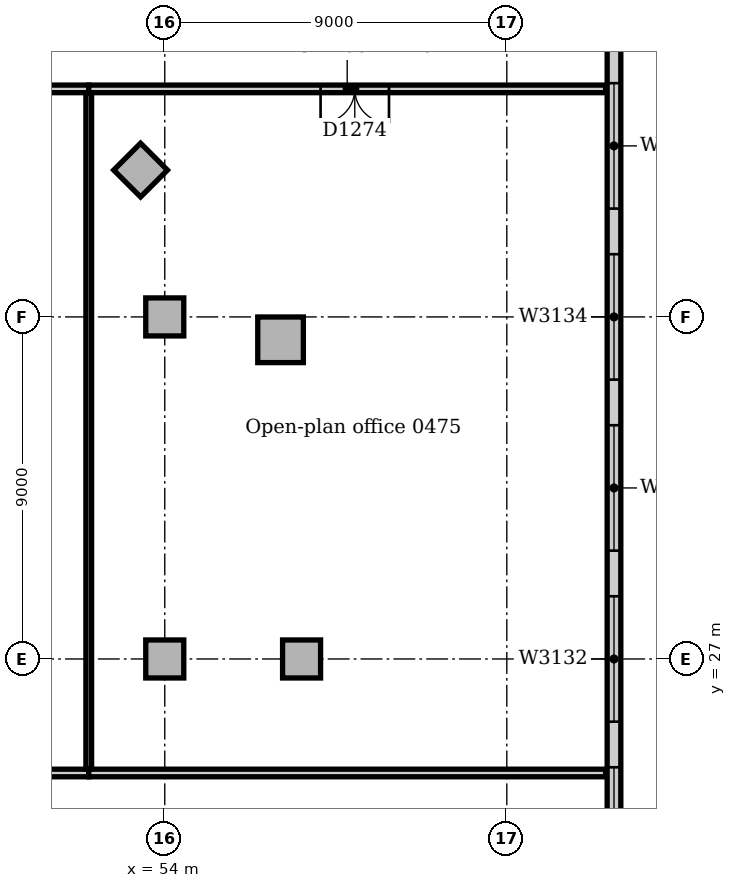
"""IFC4 building model, lengths in metres.
Left out: names, types, materials, properties, quantities, classifications, styles, units other than length and angle.
Written with IfcOpenShell. Run it as: python <this file> out.ifc"""

import sys

from ifc_helpers import new_model, si_unit, direction, frame, frame_2d, origin, origin_2d, place, context, subcontext, project, spatial, rectangle, extrude, element, fill, save


model = new_model("IFC4")
c1 = context("Model", 3, precision=1e-05, world=origin(), true_north=direction((0.0, 1.0)))
c2 = subcontext(c1, "Body", "Model", "MODEL_VIEW")
j1 = project(units=[si_unit("LENGTHUNIT", "METRE"), si_unit("PLANEANGLEUNIT", "RADIAN")], contexts=[c1])
p1 = place(None, origin())
s1 = spatial("IfcSite", under=j1, at=p1, CompositionType="ELEMENT")
p2 = place(p1, origin())
s2 = spatial("IfcBuilding", under=s1, at=p2, CompositionType="ELEMENT")
p3 = place(p2, frame((0.0, 0.0, 21.0)))
s3 = spatial("IfcBuildingStorey", under=s2, at=p3, CompositionType="ELEMENT", Elevation=21.0)
p4 = place(p3, frame((57.047, 35.398, 0.0), z_axis=(0.0, 0.0, 1.0), x_axis=(1.0, 0.0, 0.0)))
e1 = element("IfcColumn", 1, at=p4, inside=s3, PredefinedType="COLUMN", context=c2, shape_type="SweptSolid", body=[
    extrude(rectangle(XDim=1.2, YDim=1.2, at=origin_2d()), origin(), (0.0, 0.0, 1.0), 4.85),
])
for number, where, z_axis, x_axis in (
    (2, (57.6, 27.0, 0.0), (0.0, 0.0, 1.0), (1.0, 0.0, 0.0)),
    (3, (53.364, 39.864, 0.0), (0.0, 0.0, 1.0), (0.707, 0.707, 0.0)),
    (4, (54.0, 27.0, 0.0), (0.0, 0.0, 1.0), (1.0, 0.0, 0.0)),
    (5, (54.0, 36.0, 0.0), (0.0, 0.0, 1.0), (1.0, 0.0, 0.0)),
):
    element("IfcColumn", number, at=place(p3, frame(where, z_axis=z_axis, x_axis=x_axis)), inside=s3, PredefinedType="COLUMN", context=c2, shape_type="SweptSolid", body=[
        extrude(rectangle(XDim=1.0, YDim=1.0, at=origin_2d()), origin(), (0.0, 0.0, 1.0), 4.85),
    ])
p5 = place(p3, frame((65.82, -9.0, 0.0), z_axis=(0.0, 0.0, 1.0), x_axis=(0.0, 1.0, 0.0)))
e6 = element("IfcWall", 6, at=p5, inside=s3, PredefinedType="STANDARD", context=c2, shape_type="SweptSolid", body=[
    extrude(rectangle(XDim=63.0, YDim=0.36, at=frame_2d((31.5, 0.0))), origin(), (0.0, 0.0, 1.0), 4.85),
])
p6 = place(p5, frame((2.85, 0.0, 0.9)))
e7 = element("IfcOpeningElement", 7, at=p6, cuts=e6, PredefinedType="OPENING", context=c2, shape_type="SweptSolid", body=[
    extrude(rectangle(XDim=3.3, YDim=2.4, at=frame_2d((1.65, 1.2))), frame((0.0, 0.19, 0.0), z_axis=(0.0, -1.0, 0.0), x_axis=(1.0, 0.0, 0.0)), (0.0, 0.0, 1.0), 0.38),
])
p7 = place(p5, frame((7.35, 0.0, 0.9)))
e8 = element("IfcOpeningElement", 8, at=p7, cuts=e6, PredefinedType="OPENING", context=c2, shape_type="SweptSolid", body=[
    extrude(rectangle(XDim=3.3, YDim=2.4, at=frame_2d((1.65, 1.2))), frame((0.0, 0.19, 0.0), z_axis=(0.0, -1.0, 0.0), x_axis=(1.0, 0.0, 0.0)), (0.0, 0.0, 1.0), 0.38),
])
p8 = place(p5, frame((11.85, 0.0, 0.9)))
e9 = element("IfcOpeningElement", 9, at=p8, cuts=e6, PredefinedType="OPENING", context=c2, shape_type="SweptSolid", body=[
    extrude(rectangle(XDim=3.3, YDim=2.4, at=frame_2d((1.65, 1.2))), frame((0.0, 0.19, 0.0), z_axis=(0.0, -1.0, 0.0), x_axis=(1.0, 0.0, 0.0)), (0.0, 0.0, 1.0), 0.38),
])
p9 = place(p5, frame((16.35, 0.0, 0.9)))
e10 = element("IfcOpeningElement", 10, at=p9, cuts=e6, PredefinedType="OPENING", context=c2, shape_type="SweptSolid", body=[
    extrude(rectangle(XDim=3.3, YDim=2.4, at=frame_2d((1.65, 1.2))), frame((0.0, 0.19, 0.0), z_axis=(0.0, -1.0, 0.0), x_axis=(1.0, 0.0, 0.0)), (0.0, 0.0, 1.0), 0.38),
])
p10 = place(p5, frame((20.85, 0.0, 0.9)))
e11 = element("IfcOpeningElement", 11, at=p10, cuts=e6, PredefinedType="OPENING", context=c2, shape_type="SweptSolid", body=[
    extrude(rectangle(XDim=3.3, YDim=2.4, at=frame_2d((1.65, 1.2))), frame((0.0, 0.19, 0.0), z_axis=(0.0, -1.0, 0.0), x_axis=(1.0, 0.0, 0.0)), (0.0, 0.0, 1.0), 0.38),
])
p11 = place(p5, frame((25.35, 0.0, 0.9)))
e12 = element("IfcOpeningElement", 12, at=p11, cuts=e6, PredefinedType="OPENING", context=c2, shape_type="SweptSolid", body=[
    extrude(rectangle(XDim=3.3, YDim=2.4, at=frame_2d((1.65, 1.2))), frame((0.0, 0.19, 0.0), z_axis=(0.0, -1.0, 0.0), x_axis=(1.0, 0.0, 0.0)), (0.0, 0.0, 1.0), 0.38),
])
p12 = place(p5, frame((29.85, 0.0, 0.9)))
e13 = element("IfcOpeningElement", 13, at=p12, cuts=e6, PredefinedType="OPENING", context=c2, shape_type="SweptSolid", body=[
    extrude(rectangle(XDim=3.3, YDim=2.4, at=frame_2d((1.65, 1.2))), frame((0.0, 0.19, 0.0), z_axis=(0.0, -1.0, 0.0), x_axis=(1.0, 0.0, 0.0)), (0.0, 0.0, 1.0), 0.38),
])
p13 = place(p5, frame((34.35, 0.0, 0.9)))
e14 = element("IfcOpeningElement", 14, at=p13, cuts=e6, PredefinedType="OPENING", context=c2, shape_type="SweptSolid", body=[
    extrude(rectangle(XDim=3.3, YDim=2.4, at=frame_2d((1.65, 1.2))), frame((0.0, 0.19, 0.0), z_axis=(0.0, -1.0, 0.0), x_axis=(1.0, 0.0, 0.0)), (0.0, 0.0, 1.0), 0.38),
])
p14 = place(p5, frame((38.85, 0.0, 0.9)))
e15 = element("IfcOpeningElement", 15, at=p14, cuts=e6, PredefinedType="OPENING", context=c2, shape_type="SweptSolid", body=[
    extrude(rectangle(XDim=3.3, YDim=2.4, at=frame_2d((1.65, 1.2))), frame((0.0, 0.19, 0.0), z_axis=(0.0, -1.0, 0.0), x_axis=(1.0, 0.0, 0.0)), (0.0, 0.0, 1.0), 0.38),
])
p15 = place(p5, frame((43.35, 0.0, 0.9)))
e16 = element("IfcOpeningElement", 16, at=p15, cuts=e6, PredefinedType="OPENING", context=c2, shape_type="SweptSolid", body=[
    extrude(rectangle(XDim=3.3, YDim=2.4, at=frame_2d((1.65, 1.2))), frame((0.0, 0.19, 0.0), z_axis=(0.0, -1.0, 0.0), x_axis=(1.0, 0.0, 0.0)), (0.0, 0.0, 1.0), 0.38),
])
p16 = place(p5, frame((47.85, 0.0, 0.9)))
e17 = element("IfcOpeningElement", 17, at=p16, cuts=e6, PredefinedType="OPENING", context=c2, shape_type="SweptSolid", body=[
    extrude(rectangle(XDim=3.3, YDim=2.4, at=frame_2d((1.65, 1.2))), frame((0.0, 0.19, 0.0), z_axis=(0.0, -1.0, 0.0), x_axis=(1.0, 0.0, 0.0)), (0.0, 0.0, 1.0), 0.38),
])
p17 = place(p5, frame((52.35, 0.0, 0.9)))
e18 = element("IfcOpeningElement", 18, at=p17, cuts=e6, PredefinedType="OPENING", context=c2, shape_type="SweptSolid", body=[
    extrude(rectangle(XDim=3.3, YDim=2.4, at=frame_2d((1.65, 1.2))), frame((0.0, 0.19, 0.0), z_axis=(0.0, -1.0, 0.0), x_axis=(1.0, 0.0, 0.0)), (0.0, 0.0, 1.0), 0.38),
])
p18 = place(p5, frame((56.85, 0.0, 0.9)))
e19 = element("IfcOpeningElement", 19, at=p18, cuts=e6, PredefinedType="OPENING", context=c2, shape_type="SweptSolid", body=[
    extrude(rectangle(XDim=3.3, YDim=2.4, at=frame_2d((1.65, 1.2))), frame((0.0, 0.19, 0.0), z_axis=(0.0, -1.0, 0.0), x_axis=(1.0, 0.0, 0.0)), (0.0, 0.0, 1.0), 0.38),
])
p19 = place(p3, frame((37.5, 42.0, 0.0), z_axis=(0.0, 0.0, 1.0), x_axis=(1.0, 0.0, 0.0)))
e20 = element("IfcWall", 20, at=p19, inside=s3, PredefinedType="PARTITIONING", context=c2, shape_type="SweptSolid", body=[
    extrude(rectangle(XDim=14.5, YDim=0.2, at=frame_2d((7.25, 0.0))), origin(), (0.0, 0.0, 1.0), 4.85),
])
p20 = place(p19, frame((6.35, 0.0, 0.0)))
e21 = element("IfcOpeningElement", 21, at=p20, cuts=e20, PredefinedType="OPENING", context=c2, shape_type="SweptSolid", body=[
    extrude(rectangle(XDim=1.8, YDim=2.1, at=frame_2d((0.9, 1.05))), frame((0.0, 0.11, 0.0), z_axis=(0.0, -1.0, 0.0), x_axis=(1.0, 0.0, 0.0)), (0.0, 0.0, 1.0), 0.22),
])
p21 = place(p3, frame((52.0, 42.0, 0.0), z_axis=(0.0, 0.0, 1.0), x_axis=(1.0, 0.0, 0.0)))
e22 = element("IfcWall", 22, at=p21, inside=s3, PredefinedType="PARTITIONING", context=c2, shape_type="SweptSolid", body=[
    extrude(rectangle(XDim=13.6, YDim=0.2, at=frame_2d((6.8, 0.0))), origin(), (0.0, 0.0, 1.0), 4.7),
])
p22 = place(p21, frame((6.1, 0.0, 0.0)))
e23 = element("IfcOpeningElement", 23, at=p22, cuts=e22, PredefinedType="OPENING", context=c2, shape_type="SweptSolid", body=[
    extrude(rectangle(XDim=1.8, YDim=2.1, at=frame_2d((0.9, 1.05))), frame((0.0, 0.11, 0.0), z_axis=(0.0, -1.0, 0.0), x_axis=(1.0, 0.0, 0.0)), (0.0, 0.0, 1.0), 0.22),
])
p23 = place(p3, frame((37.5, 24.0, 0.0), z_axis=(0.0, 0.0, 1.0), x_axis=(1.0, 0.0, 0.0)))
e24 = element("IfcWall", 24, at=p23, inside=s3, PredefinedType="PARTITIONING", context=c2, shape_type="SweptSolid", body=[
    extrude(rectangle(XDim=14.5, YDim=0.2, at=frame_2d((7.25, 0.0))), origin(), (0.0, 0.0, 1.0), 4.85),
])
p24 = place(p3, frame((52.0, 24.0, 0.0), z_axis=(0.0, 0.0, 1.0), x_axis=(1.0, 0.0, 0.0)))
e25 = element("IfcWall", 25, at=p24, inside=s3, PredefinedType="PARTITIONING", context=c2, shape_type="SweptSolid", body=[
    extrude(rectangle(XDim=13.6, YDim=0.2, at=frame_2d((6.8, 0.0))), origin(), (0.0, 0.0, 1.0), 4.7),
])
p25 = place(p3, frame((52.0, 24.1, 0.0), z_axis=(0.0, 0.0, 1.0), x_axis=(0.0, 1.0, 0.0)))
e26 = element("IfcWall", 26, at=p25, inside=s3, PredefinedType="PARTITIONING", context=c2, shape_type="SweptSolid", body=[
    extrude(rectangle(XDim=17.8, YDim=0.15, at=frame_2d((8.9, 0.0))), origin(), (0.0, 0.0, 1.0), 4.85),
])
p26 = place(p12, origin())
e27 = element("IfcWindow", 27, at=p26, inside=s3, PartitioningType="SINGLE_PANEL", PredefinedType="WINDOW", context=c2, shape_type="SweptSolid", body=[
    extrude(rectangle(XDim=3.3, YDim=2.4, at=frame_2d((1.65, 1.2))), frame((0.0, 0.13, 0.0), z_axis=(0.0, -1.0, 0.0), x_axis=(1.0, 0.0, 0.0)), (0.0, 0.0, 1.0), 0.06),
])
fill(e13, e27)
p27 = place(p13, origin())
e28 = element("IfcWindow", 28, at=p27, inside=s3, PartitioningType="SINGLE_PANEL", PredefinedType="WINDOW", context=c2, shape_type="SweptSolid", body=[
    extrude(rectangle(XDim=3.3, YDim=2.4, at=frame_2d((1.65, 1.2))), frame((0.0, 0.13, 0.0), z_axis=(0.0, -1.0, 0.0), x_axis=(1.0, 0.0, 0.0)), (0.0, 0.0, 1.0), 0.06),
])
fill(e14, e28)
p28 = place(p14, origin())
e29 = element("IfcWindow", 29, at=p28, inside=s3, PartitioningType="SINGLE_PANEL", PredefinedType="WINDOW", context=c2, shape_type="SweptSolid", body=[
    extrude(rectangle(XDim=3.3, YDim=2.4, at=frame_2d((1.65, 1.2))), frame((0.0, 0.13, 0.0), z_axis=(0.0, -1.0, 0.0), x_axis=(1.0, 0.0, 0.0)), (0.0, 0.0, 1.0), 0.06),
])
fill(e15, e29)
p29 = place(p15, origin())
e30 = element("IfcWindow", 30, at=p29, inside=s3, PartitioningType="SINGLE_PANEL", PredefinedType="WINDOW", context=c2, shape_type="SweptSolid", body=[
    extrude(rectangle(XDim=3.3, YDim=2.4, at=frame_2d((1.65, 1.2))), frame((0.0, 0.13, 0.0), z_axis=(0.0, -1.0, 0.0), x_axis=(1.0, 0.0, 0.0)), (0.0, 0.0, 1.0), 0.06),
])
fill(e16, e30)
p30 = place(p16, origin())
e31 = element("IfcWindow", 31, at=p30, inside=s3, PartitioningType="SINGLE_PANEL", PredefinedType="WINDOW", context=c2, shape_type="SweptSolid", body=[
    extrude(rectangle(XDim=3.3, YDim=2.4, at=frame_2d((1.65, 1.2))), frame((0.0, 0.13, 0.0), z_axis=(0.0, -1.0, 0.0), x_axis=(1.0, 0.0, 0.0)), (0.0, 0.0, 1.0), 0.06),
])
fill(e17, e31)
p31 = place(p22, frame((1.8, 0.0, 0.0), z_axis=(0.0, 0.0, 1.0), x_axis=(-1.0, 0.0, 0.0)))
e32 = element("IfcDoor", 32, at=p31, inside=s3, OperationType="DOUBLE_DOOR_SINGLE_SWING", PredefinedType="DOOR", context=c2, shape_type="SweptSolid", body=[
    extrude(rectangle(XDim=1.8, YDim=2.1, at=frame_2d((0.9, 1.05))), frame((0.0, 0.025, 0.0), z_axis=(0.0, -1.0, 0.0), x_axis=(1.0, 0.0, 0.0)), (0.0, 0.0, 1.0), 0.05),
])
fill(e23, e32)
save(model, sys.argv[1])
